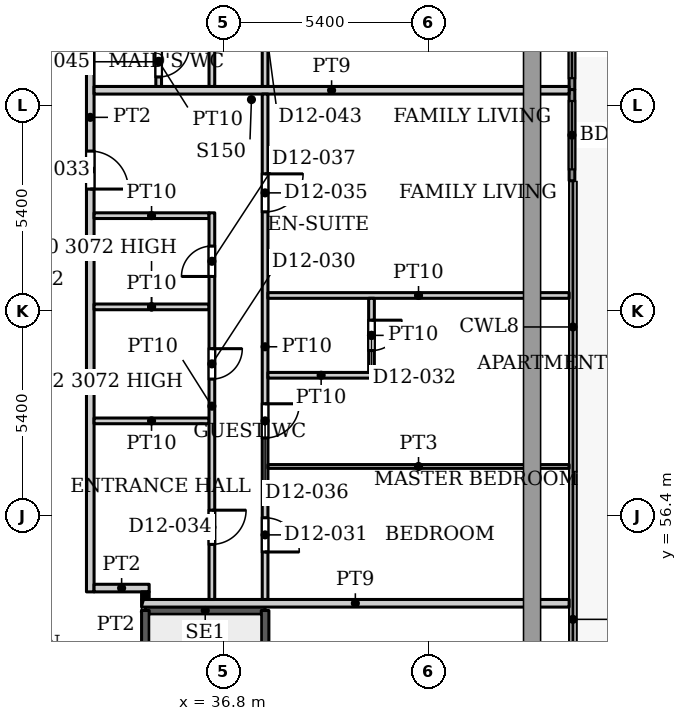
"""IFC4 building model, lengths in metres.
Left out: names, types, materials, properties, quantities, classifications, styles, units other than length and angle.
Written with IfcOpenShell. Run it as: python <this file> out.ifc"""

import sys

from ifc_helpers import new_model, si_unit, direction, frame, frame_2d, origin, place, context, subcontext, project, spatial, rectangle, extrude, source, transform, mapped, element, fill, save


model = new_model("IFC4")
c1 = context("Model", 3, precision=1e-05, world=origin(), true_north=direction((0.0, 1.0)))
c2 = subcontext(c1, "Body", "Model", "MODEL_VIEW")
j1 = project(units=[si_unit("LENGTHUNIT", "METRE"), si_unit("PLANEANGLEUNIT", "RADIAN")], contexts=[c1])
p1 = place(None, origin())
s1 = spatial("IfcSite", under=j1, at=p1, CompositionType="ELEMENT")
p2 = place(p1, origin())
s2 = spatial("IfcBuilding", under=s1, at=p2, CompositionType="ELEMENT")
p3 = place(p2, frame((0.0, 0.0, 57.8)))
s3 = spatial("IfcBuildingStorey", under=s2, at=p3, CompositionType="ELEMENT", Elevation=57.8)
p4 = place(p3, frame((45.975, 70.018, 0.0), z_axis=(0.0, 0.0, 1.0), x_axis=(0.0, -1.0, 0.0)))
e1 = element("IfcWall", 1, at=p4, inside=s3, PredefinedType="SOLIDWALL", context=c2, shape_type="SweptSolid", body=[
    extrude(rectangle(XDim=2.4, YDim=0.15, at=frame_2d((1.2, 0.0))), origin(), (0.0, 0.0, 1.0), 3.75),
])
p5 = place(p4, frame((0.3, 0.0, 0.0)))
e2 = element("IfcOpeningElement", 2, at=p5, cuts=e1, PredefinedType="OPENING", context=c2, shape_type="SweptSolid", body=[
    extrude(rectangle(XDim=1.8, YDim=2.4, at=frame_2d((0.9, 1.2))), frame((0.0, 0.085, 0.0), z_axis=(0.0, -1.0, 0.0), x_axis=(1.0, 0.0, 0.0)), (0.0, 0.0, 1.0), 0.17),
])
p6 = place(p3, frame((45.975, 67.618, 0.0), z_axis=(0.0, 0.0, 1.0), x_axis=(0.0, -1.0, 0.0)))
e3 = element("IfcWall", 3, at=p6, inside=s3, PredefinedType="SOLIDWALL", context=c2, shape_type="SweptSolid", body=[
    extrude(rectangle(XDim=2.4, YDim=0.15, at=frame_2d((1.2, 0.0))), origin(), (0.0, 0.0, 1.0), 3.75),
])
p7 = place(p6, frame((0.3, 0.0, 0.0)))
e4 = element("IfcOpeningElement", 4, at=p7, cuts=e3, PredefinedType="OPENING", context=c2, shape_type="SweptSolid", body=[
    extrude(rectangle(XDim=1.8, YDim=2.4, at=frame_2d((0.9, 1.2))), frame((0.0, 0.085, 0.0), z_axis=(0.0, -1.0, 0.0), x_axis=(1.0, 0.0, 0.0)), (0.0, 0.0, 1.0), 0.17),
])
p8 = place(p3, frame((34.75, 53.91, 0.0), z_axis=(0.0, 0.0, 1.0), x_axis=(1.0, 0.0, 0.0)))
e5 = element("IfcWall", 5, at=p8, inside=s3, PredefinedType="SHEAR", context=c2, shape_type="SweptSolid", body=[
    extrude(rectangle(XDim=3.15, YDim=0.2, at=frame_2d((1.575, 0.0))), origin(), (0.0, 0.0, 1.0), 3.9),
])
p9 = place(p3, frame((34.75, 47.5, 0.0), z_axis=(0.0, 0.0, 1.0), x_axis=(0.0, 1.0, 0.0)))
e6 = element("IfcWall", 6, at=p9, inside=s3, PredefinedType="SHEAR", context=c2, shape_type="SweptSolid", body=[
    extrude(rectangle(XDim=6.41, YDim=0.2, at=frame_2d((3.205, 0.0))), origin(), (0.0, 0.0, 1.0), 3.9),
])
p10 = place(p3, frame((37.9, 44.75, 0.0), z_axis=(0.0, 0.0, 1.0), x_axis=(0.0, 1.0, 0.0)))
e7 = element("IfcWall", 7, at=p10, inside=s3, PredefinedType="SHEAR", context=c2, shape_type="SweptSolid", body=[
    extrude(rectangle(XDim=9.16, YDim=0.2, at=frame_2d((4.58, 0.0))), origin(), (0.0, 0.0, 1.0), 3.9),
])
p11 = place(p3, frame((33.3, 54.4, 0.0), z_axis=(0.0, 0.0, 1.0), x_axis=(0.0, 1.0, 0.0)))
e8 = element("IfcWall", 8, at=p11, inside=s3, PredefinedType="PARTITIONING", context=c2, shape_type="SweptSolid", body=[
    extrude(rectangle(XDim=24.975, YDim=0.2, at=frame_2d((12.488, 0.0))), origin(), (0.0, 0.0, 1.0), 3.6),
])
p12 = place(p11, frame((10.6, 0.0, 0.0)))
e9 = element("IfcOpeningElement", 9, at=p12, cuts=e8, PredefinedType="OPENING", context=c2, shape_type="SweptSolid", body=[
    extrude(rectangle(XDim=1.0, YDim=2.1, at=frame_2d((0.5, 1.05))), frame((0.0, 0.11, 0.0), z_axis=(0.0, -1.0, 0.0), x_axis=(1.0, 0.0, 0.0)), (0.0, 0.0, 1.0), 0.22),
])
p13 = place(p11, frame((22.0, 0.0, 0.0)))
e10 = element("IfcOpeningElement", 10, at=p13, cuts=e8, PredefinedType="OPENING", context=c2, shape_type="SweptSolid", body=[
    extrude(rectangle(XDim=1.0, YDim=2.1, at=frame_2d((0.5, 1.05))), frame((0.0, 0.11, 0.0), z_axis=(0.0, -1.0, 0.0), x_axis=(1.0, 0.0, 0.0)), (0.0, 0.0, 1.0), 0.22),
])
p14 = place(p3, frame((33.4, 54.5, 0.0), z_axis=(0.0, 0.0, 1.0), x_axis=(1.0, 0.0, 0.0)))
e11 = element("IfcWall", 11, at=p14, inside=s3, PredefinedType="PARTITIONING", context=c2, shape_type="SweptSolid", body=[
    extrude(rectangle(XDim=1.45, YDim=0.2, at=frame_2d((0.725, 0.0))), origin(), (0.0, 0.0, 1.0), 3.6),
])
p15 = place(p3, frame((33.4, 58.9, 0.0), z_axis=(0.0, 0.0, 1.0), x_axis=(1.0, 0.0, 0.0)))
e12 = element("IfcWall", 12, at=p15, inside=s3, PredefinedType="PARTITIONING", context=c2, shape_type="SweptSolid", body=[
    extrude(rectangle(XDim=3.025, YDim=0.15, at=frame_2d((1.513, 0.0))), origin(), (0.0, 0.0, 1.0), 3.6),
])
p16 = place(p3, frame((33.4, 61.9, 0.0), z_axis=(0.0, 0.0, 1.0), x_axis=(1.0, 0.0, 0.0)))
e13 = element("IfcWall", 13, at=p16, inside=s3, PredefinedType="PARTITIONING", context=c2, shape_type="SweptSolid", body=[
    extrude(rectangle(XDim=3.025, YDim=0.15, at=frame_2d((1.513, 0.0))), origin(), (0.0, 0.0, 1.0), 3.072),
])
p17 = place(p3, frame((33.4, 64.3, 0.0), z_axis=(0.0, 0.0, 1.0), x_axis=(1.0, 0.0, 0.0)))
e14 = element("IfcWall", 14, at=p17, inside=s3, PredefinedType="PARTITIONING", context=c2, shape_type="SweptSolid", body=[
    extrude(rectangle(XDim=3.025, YDim=0.15, at=frame_2d((1.513, 0.0))), origin(), (0.0, 0.0, 1.0), 3.6),
])
p18 = place(p3, frame((33.4, 67.6, 0.0), z_axis=(0.0, 0.0, 1.0), x_axis=(1.0, 0.0, 0.0)))
e15 = element("IfcWall", 15, at=p18, inside=s3, PredefinedType="PARTITIONING", context=c2, shape_type="SweptSolid", body=[
    extrude(rectangle(XDim=12.5, YDim=0.2, at=frame_2d((6.25, 0.0))), origin(), (0.0, 0.0, 1.0), 3.6),
])
p19 = place(p3, frame((34.65, 54.1, 0.0), z_axis=(0.0, 0.0, 1.0), x_axis=(1.0, 0.0, 0.0)))
e16 = element("IfcWall", 16, at=p19, inside=s3, PredefinedType="PARTITIONING", context=c2, shape_type="SweptSolid", body=[
    extrude(rectangle(XDim=11.25, YDim=0.2, at=frame_2d((5.625, 0.0))), origin(), (0.0, 0.0, 1.0), 3.6),
])
p20 = place(p3, frame((34.75, 54.2, 0.0), z_axis=(0.0, 0.0, 1.0), x_axis=(0.0, 1.0, 0.0)))
e17 = element("IfcWall", 17, at=p20, inside=s3, PredefinedType="PARTITIONING", context=c2, shape_type="SweptSolid", body=[
    extrude(rectangle(XDim=0.2, YDim=0.2, at=frame_2d((0.1, 0.0))), origin(), (0.0, 0.0, 1.0), 3.6),
])
p21 = place(p3, frame((35.1, 67.7, 0.0), z_axis=(0.0, 0.0, 1.0), x_axis=(0.0, 1.0, 0.0)))
e18 = element("IfcWall", 18, at=p21, inside=s3, PredefinedType="PARTITIONING", context=c2, shape_type="SweptSolid", body=[
    extrude(rectangle(XDim=1.325, YDim=0.15, at=frame_2d((0.663, 0.0))), origin(), (0.0, 0.0, 1.0), 3.6),
])
p22 = place(p21, frame((0.25, 0.0, 0.0)))
e19 = element("IfcOpeningElement", 19, at=p22, cuts=e18, PredefinedType="OPENING", context=c2, shape_type="SweptSolid", body=[
    extrude(rectangle(XDim=0.8, YDim=2.1, at=frame_2d((0.4, 1.05))), frame((0.0, 0.085, 0.0), z_axis=(0.0, -1.0, 0.0), x_axis=(1.0, 0.0, 0.0)), (0.0, 0.0, 1.0), 0.17),
])
p23 = place(p3, frame((36.5, 54.2, 0.0), z_axis=(0.0, 0.0, 1.0), x_axis=(0.0, 1.0, 0.0)))
e20 = element("IfcWall", 20, at=p23, inside=s3, PredefinedType="PARTITIONING", context=c2, shape_type="SweptSolid", body=[
    extrude(rectangle(XDim=10.175, YDim=0.15, at=frame_2d((5.087, 0.0))), origin(), (0.0, 0.0, 1.0), 3.6),
])
p24 = place(p23, frame((5.8, 0.0, 0.0)))
e21 = element("IfcOpeningElement", 21, at=p24, cuts=e20, PredefinedType="OPENING", context=c2, shape_type="SweptSolid", body=[
    extrude(rectangle(XDim=0.8, YDim=2.1, at=frame_2d((0.4, 1.05))), frame((0.0, 0.085, 0.0), z_axis=(0.0, -1.0, 0.0), x_axis=(1.0, 0.0, 0.0)), (0.0, 0.0, 1.0), 0.17),
])
p25 = place(p23, frame((1.45, 0.0, 0.0)))
e22 = element("IfcOpeningElement", 22, at=p25, cuts=e20, PredefinedType="OPENING", context=c2, shape_type="SweptSolid", body=[
    extrude(rectangle(XDim=0.9, YDim=2.1, at=frame_2d((0.45, 1.05))), frame((0.0, 0.085, 0.0), z_axis=(0.0, -1.0, 0.0), x_axis=(1.0, 0.0, 0.0)), (0.0, 0.0, 1.0), 0.17),
])
p26 = place(p23, frame((8.5, 0.0, 0.0)))
e23 = element("IfcOpeningElement", 23, at=p26, cuts=e20, PredefinedType="OPENING", context=c2, shape_type="SweptSolid", body=[
    extrude(rectangle(XDim=0.8, YDim=2.1, at=frame_2d((0.4, 1.05))), frame((0.0, 0.085, 0.0), z_axis=(0.0, -1.0, 0.0), x_axis=(1.0, 0.0, 0.0)), (0.0, 0.0, 1.0), 0.17),
])
p27 = place(p3, frame((36.5, 67.7, 0.0), z_axis=(0.0, 0.0, 1.0), x_axis=(0.0, 1.0, 0.0)))
e24 = element("IfcWall", 24, at=p27, inside=s3, PredefinedType="PARTITIONING", context=c2, shape_type="SweptSolid", body=[
    extrude(rectangle(XDim=8.375, YDim=0.15, at=frame_2d((4.188, 0.0))), origin(), (0.0, 0.0, 1.0), 3.6),
])
p28 = place(p27, frame((6.85, 0.0, 0.0)))
e25 = element("IfcOpeningElement", 25, at=p28, cuts=e24, PredefinedType="OPENING", context=c2, shape_type="SweptSolid", body=[
    extrude(rectangle(XDim=0.8, YDim=2.1, at=frame_2d((0.4, 1.05))), frame((0.0, 0.085, 0.0), z_axis=(0.0, -1.0, 0.0), x_axis=(1.0, 0.0, 0.0)), (0.0, 0.0, 1.0), 0.17),
])
p29 = place(p27, frame((4.25, 0.0, 0.0)))
e26 = element("IfcOpeningElement", 26, at=p29, cuts=e24, PredefinedType="OPENING", context=c2, shape_type="SweptSolid", body=[
    extrude(rectangle(XDim=0.9, YDim=2.1, at=frame_2d((0.45, 1.05))), frame((0.0, 0.085, 0.0), z_axis=(0.0, -1.0, 0.0), x_axis=(1.0, 0.0, 0.0)), (0.0, 0.0, 1.0), 0.17),
])
p30 = place(p27, frame((1.9, 0.0, 0.0)))
e27 = element("IfcOpeningElement", 27, at=p30, cuts=e24, PredefinedType="OPENING", context=c2, shape_type="SweptSolid", body=[
    extrude(rectangle(XDim=0.8, YDim=2.1, at=frame_2d((0.4, 1.05))), frame((0.0, 0.085, 0.0), z_axis=(0.0, -1.0, 0.0), x_axis=(1.0, 0.0, 0.0)), (0.0, 0.0, 1.0), 0.17),
])
p31 = place(p3, frame((37.9, 54.2, 0.0), z_axis=(0.0, 0.0, 1.0), x_axis=(0.0, 1.0, 0.0)))
e28 = element("IfcWall", 28, at=p31, inside=s3, PredefinedType="PARTITIONING", context=c2, shape_type="SweptSolid", body=[
    extrude(rectangle(XDim=13.3, YDim=0.15, at=frame_2d((6.65, 0.0))), origin(), (0.0, 0.0, 1.0), 3.6),
])
p32 = place(p31, frame((1.25, 0.0, 0.0)))
e29 = element("IfcOpeningElement", 29, at=p32, cuts=e28, PredefinedType="OPENING", context=c2, shape_type="SweptSolid", body=[
    extrude(rectangle(XDim=0.9, YDim=2.1, at=frame_2d((0.45, 1.05))), frame((0.0, 0.085, 0.0), z_axis=(0.0, -1.0, 0.0), x_axis=(1.0, 0.0, 0.0)), (0.0, 0.0, 1.0), 0.17),
])
p33 = place(p31, frame((10.2, 0.0, 0.0)))
e30 = element("IfcOpeningElement", 30, at=p33, cuts=e28, PredefinedType="OPENING", context=c2, shape_type="SweptSolid", body=[
    extrude(rectangle(XDim=1.0, YDim=2.1, at=frame_2d((0.5, 1.05))), frame((0.0, 0.085, 0.0), z_axis=(0.0, -1.0, 0.0), x_axis=(1.0, 0.0, 0.0)), (0.0, 0.0, 1.0), 0.17),
])
p34 = place(p31, frame((4.25, 0.0, 0.0)))
e31 = element("IfcOpeningElement", 31, at=p34, cuts=e28, PredefinedType="OPENING", context=c2, shape_type="SweptSolid", body=[
    extrude(rectangle(XDim=0.9, YDim=2.1, at=frame_2d((0.45, 1.05))), frame((0.0, 0.085, 0.0), z_axis=(0.0, -1.0, 0.0), x_axis=(1.0, 0.0, 0.0)), (0.0, 0.0, 1.0), 0.17),
])
p35 = place(p3, frame((37.9, 67.7, 0.0), z_axis=(0.0, 0.0, 1.0), x_axis=(0.0, 1.0, 0.0)))
e32 = element("IfcWall", 32, at=p35, inside=s3, PredefinedType="PARTITIONING", context=c2, shape_type="SweptSolid", body=[
    extrude(rectangle(XDim=11.525, YDim=0.15, at=frame_2d((5.763, 0.0))), origin(), (0.0, 0.0, 1.0), 3.6),
])
p36 = place(p35, frame((9.35, 0.0, 0.0)))
e33 = element("IfcOpeningElement", 33, at=p36, cuts=e32, PredefinedType="OPENING", context=c2, shape_type="SweptSolid", body=[
    extrude(rectangle(XDim=0.9, YDim=2.1, at=frame_2d((0.45, 1.05))), frame((0.0, 0.085, 0.0), z_axis=(0.0, -1.0, 0.0), x_axis=(1.0, 0.0, 0.0)), (0.0, 0.0, 1.0), 0.17),
])
p37 = place(p35, frame((1.2, 0.0, 0.0)))
e34 = element("IfcOpeningElement", 34, at=p37, cuts=e32, PredefinedType="OPENING", context=c2, shape_type="SweptSolid", body=[
    extrude(rectangle(XDim=1.0, YDim=2.1, at=frame_2d((0.5, 1.05))), frame((0.0, 0.085, 0.0), z_axis=(0.0, -1.0, 0.0), x_axis=(1.0, 0.0, 0.0)), (0.0, 0.0, 1.0), 0.17),
])
p38 = place(p35, frame((6.35, 0.0, 0.0)))
e35 = element("IfcOpeningElement", 35, at=p38, cuts=e32, PredefinedType="OPENING", context=c2, shape_type="SweptSolid", body=[
    extrude(rectangle(XDim=0.9, YDim=2.1, at=frame_2d((0.45, 1.05))), frame((0.0, 0.085, 0.0), z_axis=(0.0, -1.0, 0.0), x_axis=(1.0, 0.0, 0.0)), (0.0, 0.0, 1.0), 0.17),
])
p39 = place(p3, frame((37.975, 57.7, 0.0), z_axis=(0.0, 0.0, 1.0), x_axis=(1.0, 0.0, 0.0)))
e36 = element("IfcWall", 36, at=p39, inside=s3, PredefinedType="PARTITIONING", context=c2, shape_type="SweptSolid", body=[
    extrude(rectangle(XDim=7.925, YDim=0.1, at=frame_2d((3.962, 0.0))), origin(), (0.0, 0.0, 1.0), 3.6),
])
p40 = place(p3, frame((37.975, 60.1, 0.0), z_axis=(0.0, 0.0, 1.0), x_axis=(1.0, 0.0, 0.0)))
e37 = element("IfcWall", 37, at=p40, inside=s3, PredefinedType="PARTITIONING", context=c2, shape_type="SweptSolid", body=[
    extrude(rectangle(XDim=2.8, YDim=0.15, at=frame_2d((1.4, 0.0))), origin(), (0.0, 0.0, 1.0), 3.6),
])
p41 = place(p3, frame((37.975, 62.2, 0.0), z_axis=(0.0, 0.0, 1.0), x_axis=(1.0, 0.0, 0.0)))
e38 = element("IfcWall", 38, at=p41, inside=s3, PredefinedType="PARTITIONING", context=c2, shape_type="SweptSolid", body=[
    extrude(rectangle(XDim=7.925, YDim=0.15, at=frame_2d((3.962, 0.0))), origin(), (0.0, 0.0, 1.0), 3.6),
])
p42 = place(p3, frame((40.7, 60.175, 0.0), z_axis=(0.0, 0.0, 1.0), x_axis=(0.0, 1.0, 0.0)))
e39 = element("IfcWall", 39, at=p42, inside=s3, PredefinedType="PARTITIONING", context=c2, shape_type="SweptSolid", body=[
    extrude(rectangle(XDim=1.95, YDim=0.15, at=frame_2d((0.975, 0.0))), origin(), (0.0, 0.0, 1.0), 3.6),
])
p43 = place(p42, frame((0.575, 0.0, 0.0)))
e40 = element("IfcOpeningElement", 40, at=p43, cuts=e39, PredefinedType="OPENING", context=c2, shape_type="SweptSolid", body=[
    extrude(rectangle(XDim=0.8, YDim=2.1, at=frame_2d((0.4, 1.05))), frame((0.0, 0.085, 0.0), z_axis=(0.0, -1.0, 0.0), x_axis=(1.0, 0.0, 0.0)), (0.0, 0.0, 1.0), 0.17),
])
m1 = source(origin(), c2, "Body", "SweptSolid", [
    extrude(rectangle(XDim=1.8, YDim=2.4, at=frame_2d((0.9, 1.2))), frame((0.0, 0.025, 0.0), z_axis=(0.0, -1.0, 0.0), x_axis=(1.0, 0.0, 0.0)), (0.0, 0.0, 1.0), 0.05),
])
p44 = place(p5, origin())
e41 = element("IfcDoor", 41, at=p44, inside=s3, OperationType="SLIDING_TO_LEFT", PredefinedType="DOOR", context=c2, shape_type="MappedRepresentation", body=[
    mapped(m1, transform((0.0, 0.0, 0.0), x_axis=(1.0, 0.0, 0.0), y_axis=(0.0, 1.0, 0.0), z_axis=(0.0, 0.0, 1.0), scale=1.0)),
])
fill(e2, e41)
p45 = place(p7, origin())
e42 = element("IfcDoor", 42, at=p45, inside=s3, OperationType="SLIDING_TO_LEFT", PredefinedType="DOOR", context=c2, shape_type="MappedRepresentation", body=[
    mapped(m1, transform((0.0, 0.0, 0.0), x_axis=(1.0, 0.0, 0.0), y_axis=(0.0, 1.0, 0.0), z_axis=(0.0, 0.0, 1.0), scale=1.0)),
])
fill(e4, e42)
m2 = source(origin(), c2, "Body", "SweptSolid", [
    extrude(rectangle(XDim=0.8, YDim=2.1, at=frame_2d((0.4, 1.05))), frame((0.0, 0.025, 0.0), z_axis=(0.0, -1.0, 0.0), x_axis=(1.0, 0.0, 0.0)), (0.0, 0.0, 1.0), 0.05),
])
p46 = place(p24, origin())
e43 = element("IfcDoor", 43, at=p46, inside=s3, OperationType="SINGLE_SWING_RIGHT", PredefinedType="DOOR", context=c2, shape_type="MappedRepresentation", body=[
    mapped(m2, transform((0.0, 0.0, 0.0), x_axis=(1.0, 0.0, 0.0), y_axis=(0.0, 1.0, 0.0), z_axis=(0.0, 0.0, 1.0), scale=1.0)),
])
fill(e21, e43)
m3 = source(origin(), c2, "Body", "SweptSolid", [
    extrude(rectangle(XDim=0.9, YDim=2.1, at=frame_2d((0.45, 1.05))), frame((0.0, 0.025, 0.0), z_axis=(0.0, -1.0, 0.0), x_axis=(1.0, 0.0, 0.0)), (0.0, 0.0, 1.0), 0.05),
])
p47 = place(p32, origin())
e44 = element("IfcDoor", 44, at=p47, inside=s3, OperationType="SINGLE_SWING_RIGHT", PredefinedType="DOOR", context=c2, shape_type="MappedRepresentation", body=[
    mapped(m3, transform((0.0, 0.0, 0.0), x_axis=(1.0, 0.0, 0.0), y_axis=(0.0, 1.0, 0.0), z_axis=(0.0, 0.0, 1.0), scale=1.0)),
])
fill(e29, e44)
p48 = place(p43, origin())
e45 = element("IfcDoor", 45, at=p48, inside=s3, OperationType="SINGLE_SWING_RIGHT", PredefinedType="DOOR", context=c2, shape_type="MappedRepresentation", body=[
    mapped(m2, transform((0.0, 0.0, 0.0), x_axis=(1.0, 0.0, 0.0), y_axis=(0.0, 1.0, 0.0), z_axis=(0.0, 0.0, 1.0), scale=1.0)),
])
fill(e40, e45)
m4 = source(origin(), c2, "Body", "SweptSolid", [
    extrude(rectangle(XDim=1.0, YDim=2.1, at=frame_2d((0.5, 1.05))), frame((0.0, 0.025, 0.0), z_axis=(0.0, -1.0, 0.0), x_axis=(1.0, 0.0, 0.0)), (0.0, 0.0, 1.0), 0.05),
])
p49 = place(p12, origin())
e46 = element("IfcDoor", 46, at=p49, inside=s3, OperationType="SINGLE_SWING_RIGHT", PredefinedType="DOOR", context=c2, shape_type="MappedRepresentation", body=[
    mapped(m4, transform((0.0, 0.0, 0.0), x_axis=(1.0, 0.0, 0.0), y_axis=(0.0, 1.0, 0.0), z_axis=(0.0, 0.0, 1.0), scale=1.0)),
])
fill(e9, e46)
p50 = place(p25, origin())
e47 = element("IfcDoor", 47, at=p50, inside=s3, OperationType="SINGLE_SWING_RIGHT", PredefinedType="DOOR", context=c2, shape_type="MappedRepresentation", body=[
    mapped(m3, transform((0.0, 0.0, 0.0), x_axis=(1.0, 0.0, 0.0), y_axis=(0.0, 1.0, 0.0), z_axis=(0.0, 0.0, 1.0), scale=1.0)),
])
fill(e22, e47)
m5 = source(origin(), c2, "Body", "SweptSolid", [
    extrude(rectangle(XDim=1.0, YDim=2.1, at=frame_2d((0.5, 1.05))), frame((0.0, 0.025, 0.0), z_axis=(0.0, -1.0, 0.0), x_axis=(1.0, 0.0, 0.0)), (0.0, 0.0, 1.0), 0.05),
])
p51 = place(p33, origin())
e48 = element("IfcDoor", 48, at=p51, inside=s3, OperationType="SINGLE_SWING_RIGHT", PredefinedType="DOOR", context=c2, shape_type="MappedRepresentation", body=[
    mapped(m5, transform((0.0, 0.0, 0.0), x_axis=(1.0, 0.0, 0.0), y_axis=(0.0, 1.0, 0.0), z_axis=(0.0, 0.0, 1.0), scale=1.0)),
])
fill(e30, e48)
p52 = place(p34, origin())
e49 = element("IfcDoor", 49, at=p52, inside=s3, OperationType="SINGLE_SWING_RIGHT", PredefinedType="DOOR", context=c2, shape_type="MappedRepresentation", body=[
    mapped(m3, transform((0.0, 0.0, 0.0), x_axis=(1.0, 0.0, 0.0), y_axis=(0.0, 1.0, 0.0), z_axis=(0.0, 0.0, 1.0), scale=1.0)),
])
fill(e31, e49)
p53 = place(p26, origin())
e50 = element("IfcDoor", 50, at=p53, inside=s3, OperationType="SINGLE_SWING_LEFT", PredefinedType="DOOR", context=c2, shape_type="MappedRepresentation", body=[
    mapped(m2, transform((0.0, 0.0, 0.0), x_axis=(1.0, 0.0, 0.0), y_axis=(0.0, 1.0, 0.0), z_axis=(0.0, 0.0, 1.0), scale=1.0)),
])
fill(e23, e50)
p54 = place(p22, origin())
e51 = element("IfcDoor", 51, at=p54, inside=s3, OperationType="SINGLE_SWING_RIGHT", PredefinedType="DOOR", context=c2, shape_type="MappedRepresentation", body=[
    mapped(m2, transform((0.0, 0.0, 0.0), x_axis=(1.0, 0.0, 0.0), y_axis=(0.0, 1.0, 0.0), z_axis=(0.0, 0.0, 1.0), scale=1.0)),
])
fill(e19, e51)
save(model, sys.argv[1])
